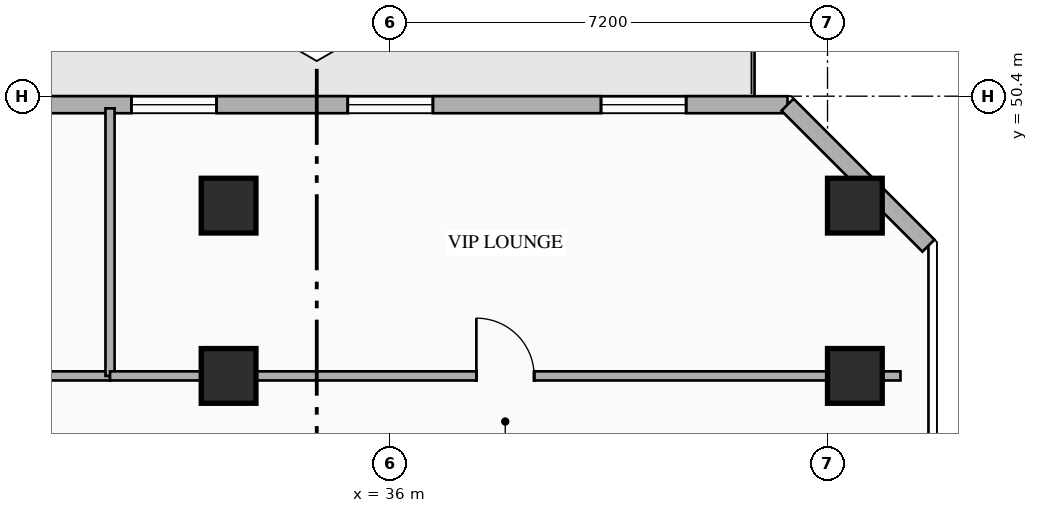
"""IFC4 building model, lengths in metres.
Left out: names, types, materials, properties, quantities, classifications, styles, units other than length and angle.
Written with IfcOpenShell. Run it as: python <this file> out.ifc"""

import sys

from ifc_helpers import new_model, si_unit, direction, frame, frame_2d, origin, origin_2d, place, context, subcontext, project, spatial, rectangle, hollow_rectangle, extrude, element, fill, save


model = new_model("IFC4")
c1 = context("Model", 3, precision=1e-05, world=origin(), true_north=direction((0.0, 1.0)))
c2 = subcontext(c1, "Body", "Model", "MODEL_VIEW")
j1 = project(units=[si_unit("LENGTHUNIT", "METRE"), si_unit("PLANEANGLEUNIT", "RADIAN")], contexts=[c1])
p1 = place(None, origin())
s1 = spatial("IfcSite", under=j1, at=p1, CompositionType="ELEMENT")
p2 = place(p1, origin())
s2 = spatial("IfcBuilding", under=s1, at=p2, CompositionType="ELEMENT")
p3 = place(p2, frame((0.0, 0.0, 81.3)))
s3 = spatial("IfcBuildingStorey", under=s2, at=p3, CompositionType="ELEMENT", Elevation=81.3)
for number, where, z_axis, x_axis in (
    (1, (33.35, 45.8, 0.0), (0.0, 0.0, 1.0), (1.0, 0.0, 0.0)),
    (2, (43.65, 45.8, 0.0), (0.0, 0.0, 1.0), (1.0, 0.0, 0.0)),
    (3, (33.35, 48.6, 0.0), (0.0, 0.0, 1.0), (1.0, 0.0, 0.0)),
    (4, (43.65, 48.6, 0.0), (0.0, 0.0, 1.0), (1.0, 0.0, 0.0)),
):
    element("IfcColumn", number, at=place(p3, frame(where, z_axis=z_axis, x_axis=x_axis)), inside=s3, PredefinedType="COLUMN", context=c2, shape_type="SweptSolid", body=[
        extrude(hollow_rectangle(XDim=0.9, YDim=0.9, WallThickness=0.036, at=origin_2d()), origin(), (0.0, 0.0, 1.0), 3.35),
    ])
p4 = place(p3, frame((12.058, 50.26, 0.0), z_axis=(0.0, 0.0, 1.0), x_axis=(1.0, 0.0, 0.0)))
e5 = element("IfcWall", 5, at=p4, inside=s3, PredefinedType="STANDARD", context=c2, shape_type="SweptSolid", body=[
    extrude(rectangle(XDim=30.484, YDim=0.28, at=frame_2d((15.242, 0.0))), origin(), (0.0, 0.0, 1.0), 3.13),
])
p5 = place(p4, frame((14.992, 0.0, 0.0)))
e6 = element("IfcOpeningElement", 6, at=p5, cuts=e5, PredefinedType="OPENING", context=c2, shape_type="SweptSolid", body=[
    extrude(rectangle(XDim=1.1, YDim=2.2, at=frame_2d((0.55, 1.1))), frame((0.0, 0.15, 0.0), z_axis=(0.0, -1.0, 0.0), x_axis=(1.0, 0.0, 0.0)), (0.0, 0.0, 1.0), 0.3),
])
p6 = place(p4, frame((0.46, 0.0, 0.85)))
e7 = element("IfcOpeningElement", 7, at=p6, cuts=e5, PredefinedType="OPENING", context=c2, shape_type="SweptSolid", body=[
    extrude(rectangle(XDim=1.4, YDim=1.8, at=frame_2d((0.7, 0.9))), frame((0.0, 0.15, 0.0), z_axis=(0.0, -1.0, 0.0), x_axis=(1.0, 0.0, 0.0)), (0.0, 0.0, 1.0), 0.3),
])
p7 = place(p4, frame((4.435, 0.0, 0.85)))
e8 = element("IfcOpeningElement", 8, at=p7, cuts=e5, PredefinedType="OPENING", context=c2, shape_type="SweptSolid", body=[
    extrude(rectangle(XDim=1.4, YDim=1.8, at=frame_2d((0.7, 0.9))), frame((0.0, 0.15, 0.0), z_axis=(0.0, -1.0, 0.0), x_axis=(1.0, 0.0, 0.0)), (0.0, 0.0, 1.0), 0.3),
])
p8 = place(p4, frame((11.361, 0.0, 0.85)))
e9 = element("IfcOpeningElement", 9, at=p8, cuts=e5, PredefinedType="OPENING", context=c2, shape_type="SweptSolid", body=[
    extrude(rectangle(XDim=1.4, YDim=1.8, at=frame_2d((0.7, 0.9))), frame((0.0, 0.15, 0.0), z_axis=(0.0, -1.0, 0.0), x_axis=(1.0, 0.0, 0.0)), (0.0, 0.0, 1.0), 0.3),
])
p9 = place(p4, frame((19.693, 0.0, 0.85)))
e10 = element("IfcOpeningElement", 10, at=p9, cuts=e5, PredefinedType="OPENING", context=c2, shape_type="SweptSolid", body=[
    extrude(rectangle(XDim=1.4, YDim=1.8, at=frame_2d((0.7, 0.9))), frame((0.0, 0.15, 0.0), z_axis=(0.0, -1.0, 0.0), x_axis=(1.0, 0.0, 0.0)), (0.0, 0.0, 1.0), 0.3),
])
p10 = place(p4, frame((23.252, 0.0, 0.85)))
e11 = element("IfcOpeningElement", 11, at=p10, cuts=e5, PredefinedType="OPENING", context=c2, shape_type="SweptSolid", body=[
    extrude(rectangle(XDim=1.4, YDim=1.8, at=frame_2d((0.7, 0.9))), frame((0.0, 0.15, 0.0), z_axis=(0.0, -1.0, 0.0), x_axis=(1.0, 0.0, 0.0)), (0.0, 0.0, 1.0), 0.3),
])
p11 = place(p4, frame((27.417, 0.0, 0.85)))
e12 = element("IfcOpeningElement", 12, at=p11, cuts=e5, PredefinedType="OPENING", context=c2, shape_type="SweptSolid", body=[
    extrude(rectangle(XDim=1.4, YDim=1.8, at=frame_2d((0.7, 0.9))), frame((0.0, 0.15, 0.0), z_axis=(0.0, -1.0, 0.0), x_axis=(1.0, 0.0, 0.0)), (0.0, 0.0, 1.0), 0.3),
])
p12 = place(p3, frame((42.542, 50.26, 0.0), z_axis=(0.0, 0.0, 1.0), x_axis=(0.707106781187, -0.707106781187, 0.0)))
e13 = element("IfcWall", 13, at=p12, inside=s3, PredefinedType="STANDARD", context=c2, shape_type="SweptSolid", body=[
    extrude(rectangle(XDim=3.278, YDim=0.28, at=frame_2d((1.639, 0.0))), origin(), (0.0, 0.0, 1.0), 3.13),
])
p13 = place(p3, frame((22.2, 45.8, 0.0), z_axis=(0.0, 0.0, 1.0), x_axis=(1.0, 0.0, 0.0)))
e14 = element("IfcWall", 14, at=p13, inside=s3, PredefinedType="PARTITIONING", context=c2, shape_type="SweptSolid", body=[
    extrude(rectangle(XDim=9.2, YDim=0.15, at=frame_2d((4.6, 0.0))), origin(), (0.0, 0.0, 1.0), 2.425),
])
p14 = place(p13, frame((5.248, 0.0, 0.0)))
e15 = element("IfcOpeningElement", 15, at=p14, cuts=e14, PredefinedType="OPENING", context=c2, shape_type="SweptSolid", body=[
    extrude(rectangle(XDim=0.95, YDim=2.15, at=frame_2d((0.475, 1.075))), frame((0.0, 0.085, 0.0), z_axis=(0.0, -1.0, 0.0), x_axis=(1.0, 0.0, 0.0)), (0.0, 0.0, 1.0), 0.17),
])
p15 = place(p3, frame((31.4, 45.8, 0.0), z_axis=(0.0, 0.0, 1.0), x_axis=(0.0, 1.0, 0.0)))
e16 = element("IfcWall", 16, at=p15, inside=s3, PredefinedType="PARTITIONING", context=c2, shape_type="SweptSolid", body=[
    extrude(rectangle(XDim=4.4, YDim=0.15, at=frame_2d((2.2, 0.0))), origin(), (0.0, 0.0, 1.0), 3.13),
])
p16 = place(p3, frame((31.4, 45.8, 0.0), z_axis=(0.0, 0.0, 1.0), x_axis=(1.0, 0.0, 0.0)))
e17 = element("IfcWall", 17, at=p16, inside=s3, PredefinedType="PARTITIONING", context=c2, shape_type="SweptSolid", body=[
    extrude(rectangle(XDim=13.0, YDim=0.15, at=frame_2d((6.5, 0.0))), origin(), (0.0, 0.0, 1.0), 2.425),
])
p17 = place(p16, frame((6.025, 0.0, 0.0)))
e18 = element("IfcOpeningElement", 18, at=p17, cuts=e17, PredefinedType="OPENING", context=c2, shape_type="SweptSolid", body=[
    extrude(rectangle(XDim=0.95, YDim=2.15, at=frame_2d((0.475, 1.075))), frame((0.0, 0.085, 0.0), z_axis=(0.0, -1.0, 0.0), x_axis=(1.0, 0.0, 0.0)), (0.0, 0.0, 1.0), 0.17),
])
p18 = place(p9, origin())
e19 = element("IfcWindow", 19, at=p18, inside=s3, PartitioningType="SINGLE_PANEL", PredefinedType="WINDOW", context=c2, shape_type="SweptSolid", body=[
    extrude(rectangle(XDim=1.4, YDim=1.8, at=frame_2d((0.7, 0.9))), frame((0.0, 0.03, 0.0), z_axis=(0.0, -1.0, 0.0), x_axis=(1.0, 0.0, 0.0)), (0.0, 0.0, 1.0), 0.06),
])
fill(e10, e19)
p19 = place(p10, origin())
e20 = element("IfcWindow", 20, at=p19, inside=s3, PartitioningType="SINGLE_PANEL", PredefinedType="WINDOW", context=c2, shape_type="SweptSolid", body=[
    extrude(rectangle(XDim=1.4, YDim=1.8, at=frame_2d((0.7, 0.9))), frame((0.0, 0.03, 0.0), z_axis=(0.0, -1.0, 0.0), x_axis=(1.0, 0.0, 0.0)), (0.0, 0.0, 1.0), 0.06),
])
fill(e11, e20)
p20 = place(p11, origin())
e21 = element("IfcWindow", 21, at=p20, inside=s3, PartitioningType="SINGLE_PANEL", PredefinedType="WINDOW", context=c2, shape_type="SweptSolid", body=[
    extrude(rectangle(XDim=1.4, YDim=1.8, at=frame_2d((0.7, 0.9))), frame((0.0, 0.03, 0.0), z_axis=(0.0, -1.0, 0.0), x_axis=(1.0, 0.0, 0.0)), (0.0, 0.0, 1.0), 0.06),
])
fill(e12, e21)
p21 = place(p17, origin())
e22 = element("IfcDoor", 22, at=p21, inside=s3, OperationType="SINGLE_SWING_LEFT", PredefinedType="DOOR", context=c2, shape_type="SweptSolid", body=[
    extrude(rectangle(XDim=0.95, YDim=2.15, at=frame_2d((0.475, 1.075))), frame((0.0, 0.025, 0.0), z_axis=(0.0, -1.0, 0.0), x_axis=(1.0, 0.0, 0.0)), (0.0, 0.0, 1.0), 0.05),
])
fill(e18, e22)
save(model, sys.argv[1])
